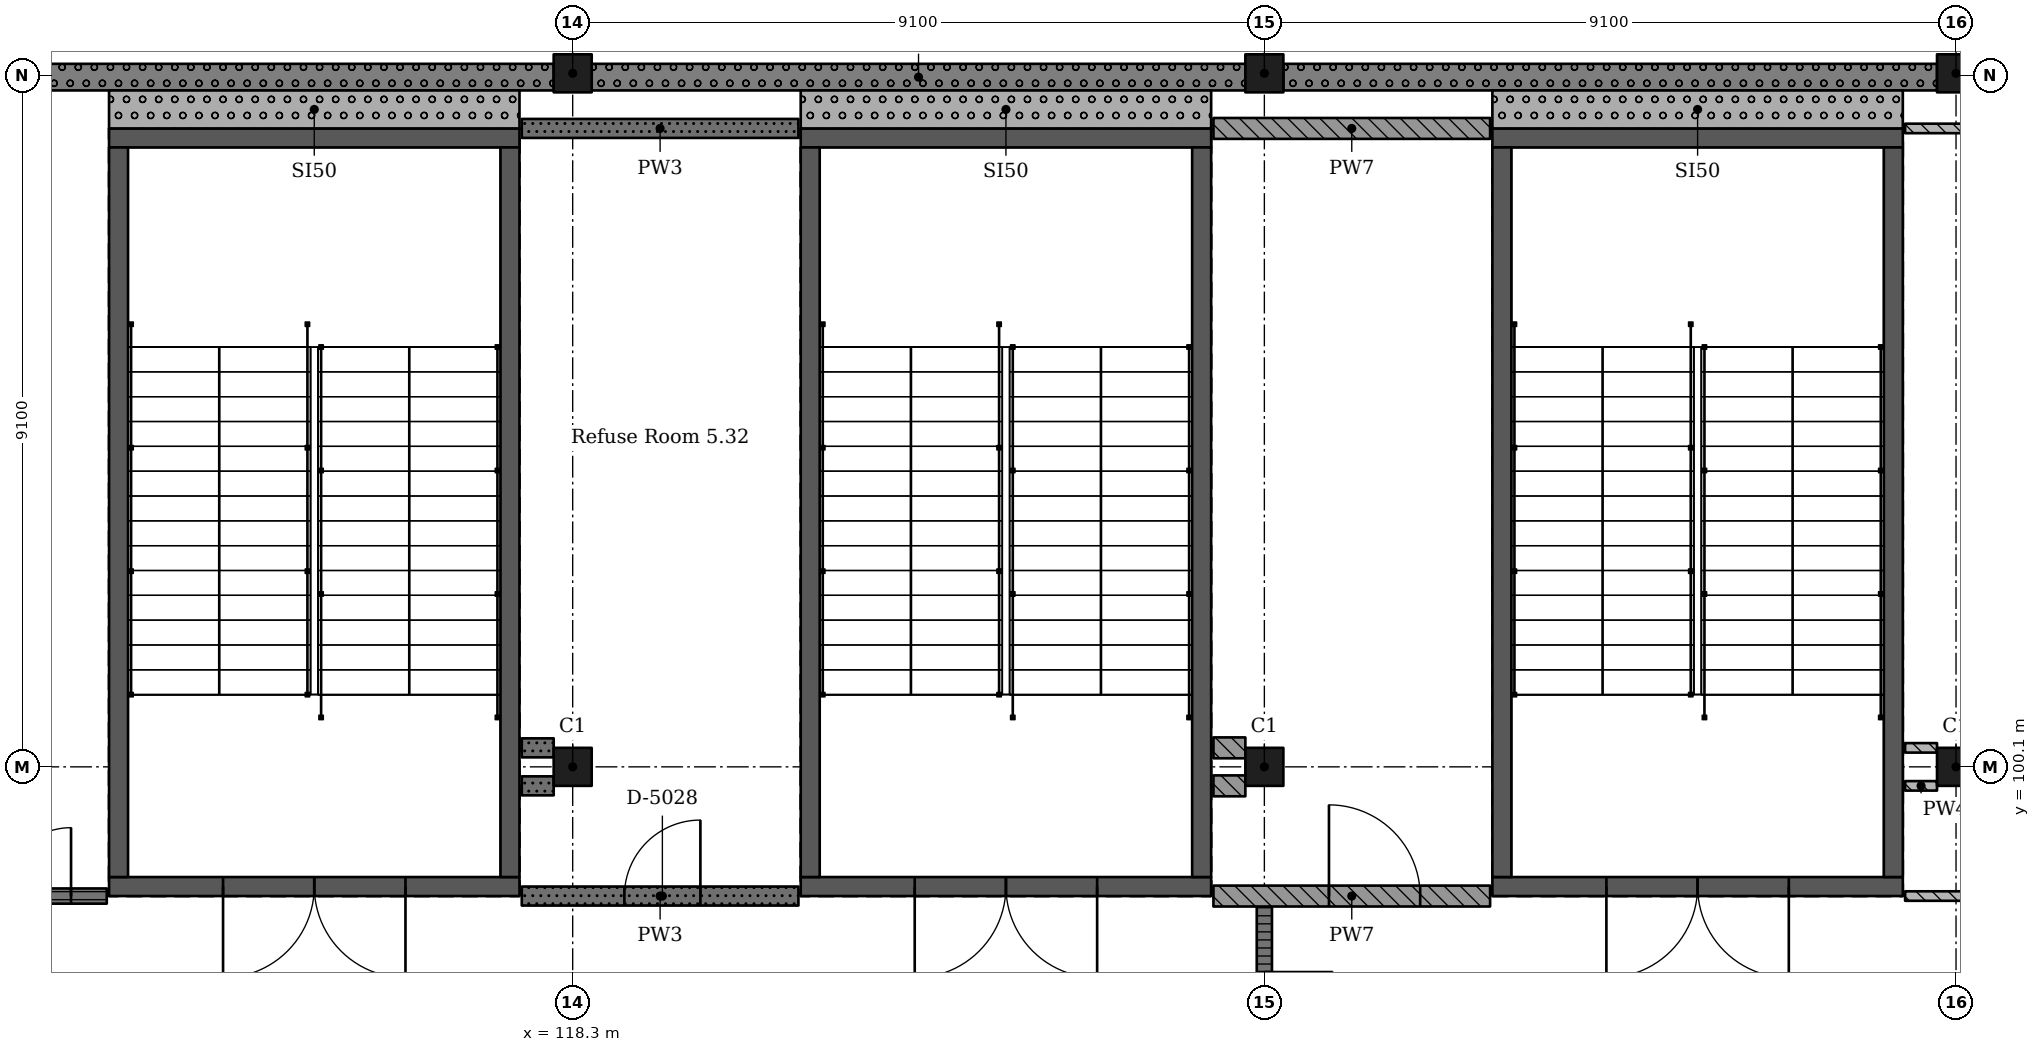
"""IFC4 building model, lengths in metres.
Left out: names, types, materials, properties, quantities, classifications, styles, units other than length and angle.
Written with IfcOpenShell. Run it as: python <this file> out.ifc"""

import sys

from ifc_helpers import new_model, si_unit, direction, frame, frame_2d, origin, origin_2d, place, context, subcontext, project, spatial, rectangle, extrude, element, fill, save


model = new_model("IFC4")
c1 = context("Model", 3, precision=1e-05, world=origin(), true_north=direction((0.0, 1.0)))
c2 = subcontext(c1, "Body", "Model", "MODEL_VIEW")
j1 = project(units=[si_unit("LENGTHUNIT", "METRE"), si_unit("PLANEANGLEUNIT", "RADIAN")], contexts=[c1])
p1 = place(None, origin())
s1 = spatial("IfcSite", under=j1, at=p1, CompositionType="ELEMENT")
p2 = place(p1, origin())
s2 = spatial("IfcBuilding", under=s1, at=p2, CompositionType="ELEMENT")
p3 = place(p2, frame((0.0, 0.0, 24.57)))
s3 = spatial("IfcBuildingStorey", under=s2, at=p3, CompositionType="ELEMENT", Elevation=24.57)
for number, where, z_axis, x_axis in (
    (1, (118.3, 100.1, 0.0), (0.0, 0.0, 1.0), (1.0, 0.0, 0.0)),
    (2, (118.3, 109.225, 0.0), (0.0, 0.0, 1.0), (1.0, 0.0, 0.0)),
    (3, (127.4, 100.1, 0.0), (0.0, 0.0, 1.0), (1.0, 0.0, 0.0)),
    (4, (127.4, 109.225, 0.0), (0.0, 0.0, 1.0), (1.0, 0.0, 0.0)),
    (5, (136.5, 100.1, 0.0), (0.0, 0.0, 1.0), (1.0, 0.0, 0.0)),
    (6, (136.5, 109.225, 0.0), (0.0, 0.0, 1.0), (1.0, 0.0, 0.0)),
):
    element("IfcColumn", number, at=place(p3, frame(where, z_axis=z_axis, x_axis=x_axis)), inside=s3, PredefinedType="COLUMN", context=c2, shape_type="SweptSolid", body=[
        extrude(rectangle(XDim=0.5, YDim=0.5, at=origin_2d()), origin(), (0.0, 0.0, 1.0), 4.55),
    ])
p4 = place(p3, frame((135.8, 98.525, 0.0), z_axis=(0.0, 0.0, 1.0), x_axis=(-1.0, 0.0, 0.0)))
e7 = element("IfcWall", 7, at=p4, inside=s3, PredefinedType="SHEAR", context=c2, shape_type="SweptSolid", body=[
    extrude(rectangle(XDim=5.4, YDim=0.25, at=frame_2d((2.7, 0.0))), origin(), (0.0, 0.0, 1.0), 4.55),
])
p5 = place(p4, frame((1.5, 0.0, 0.0)))
e8 = element("IfcOpeningElement", 8, at=p5, cuts=e7, PredefinedType="OPENING", context=c2, shape_type="SweptSolid", body=[
    extrude(rectangle(XDim=2.4, YDim=2.1, at=frame_2d((1.2, 1.05))), frame((0.0, 0.135, 0.0), z_axis=(0.0, -1.0, 0.0), x_axis=(1.0, 0.0, 0.0)), (0.0, 0.0, 1.0), 0.27),
])
p6 = place(p3, frame((135.8, 108.375, 0.0), z_axis=(0.0, 0.0, 1.0), x_axis=(-1.0, 0.0, 0.0)))
e9 = element("IfcWall", 9, at=p6, inside=s3, PredefinedType="SHEAR", context=c2, shape_type="SweptSolid", body=[
    extrude(rectangle(XDim=5.4, YDim=0.25, at=frame_2d((2.7, 0.0))), origin(), (0.0, 0.0, 1.0), 4.55),
])
for number, where, z_axis, x_axis in (
    (10, (130.525, 108.25, 0.0), (0.0, 0.0, 1.0), (0.0, -1.0, 0.0)),
    (11, (135.675, 108.25, 0.0), (0.0, 0.0, 1.0), (0.0, -1.0, 0.0)),
):
    element("IfcWall", number, at=place(p3, frame(where, z_axis=z_axis, x_axis=x_axis)), inside=s3, PredefinedType="SHEAR", context=c2, shape_type="SweptSolid", body=[
        extrude(rectangle(XDim=9.6, YDim=0.25, at=frame_2d((4.8, 0.0))), origin(), (0.0, 0.0, 1.0), 4.55),
    ])
p7 = place(p3, frame((126.7, 98.525, 0.0), z_axis=(0.0, 0.0, 1.0), x_axis=(-1.0, 0.0, 0.0)))
e12 = element("IfcWall", 12, at=p7, inside=s3, PredefinedType="SHEAR", context=c2, shape_type="SweptSolid", body=[
    extrude(rectangle(XDim=5.4, YDim=0.25, at=frame_2d((2.7, 0.0))), origin(), (0.0, 0.0, 1.0), 4.55),
])
p8 = place(p7, frame((1.5, 0.0, 0.0)))
e13 = element("IfcOpeningElement", 13, at=p8, cuts=e12, PredefinedType="OPENING", context=c2, shape_type="SweptSolid", body=[
    extrude(rectangle(XDim=2.4, YDim=2.1, at=frame_2d((1.2, 1.05))), frame((0.0, 0.135, 0.0), z_axis=(0.0, -1.0, 0.0), x_axis=(1.0, 0.0, 0.0)), (0.0, 0.0, 1.0), 0.27),
])
p9 = place(p3, frame((126.7, 108.375, 0.0), z_axis=(0.0, 0.0, 1.0), x_axis=(-1.0, 0.0, 0.0)))
e14 = element("IfcWall", 14, at=p9, inside=s3, PredefinedType="SHEAR", context=c2, shape_type="SweptSolid", body=[
    extrude(rectangle(XDim=5.4, YDim=0.25, at=frame_2d((2.7, 0.0))), origin(), (0.0, 0.0, 1.0), 4.55),
])
for number, where, z_axis, x_axis in (
    (15, (121.425, 108.25, 0.0), (0.0, 0.0, 1.0), (0.0, -1.0, 0.0)),
    (16, (126.575, 108.25, 0.0), (0.0, 0.0, 1.0), (0.0, -1.0, 0.0)),
):
    element("IfcWall", number, at=place(p3, frame(where, z_axis=z_axis, x_axis=x_axis)), inside=s3, PredefinedType="SHEAR", context=c2, shape_type="SweptSolid", body=[
        extrude(rectangle(XDim=9.6, YDim=0.25, at=frame_2d((4.8, 0.0))), origin(), (0.0, 0.0, 1.0), 4.55),
    ])
p10 = place(p3, frame((117.6, 98.525, 0.0), z_axis=(0.0, 0.0, 1.0), x_axis=(-1.0, 0.0, 0.0)))
e17 = element("IfcWall", 17, at=p10, inside=s3, PredefinedType="SHEAR", context=c2, shape_type="SweptSolid", body=[
    extrude(rectangle(XDim=5.4, YDim=0.25, at=frame_2d((2.7, 0.0))), origin(), (0.0, 0.0, 1.0), 4.55),
])
p11 = place(p10, frame((1.5, 0.0, 0.0)))
e18 = element("IfcOpeningElement", 18, at=p11, cuts=e17, PredefinedType="OPENING", context=c2, shape_type="SweptSolid", body=[
    extrude(rectangle(XDim=2.4, YDim=2.1, at=frame_2d((1.2, 1.05))), frame((0.0, 0.135, 0.0), z_axis=(0.0, -1.0, 0.0), x_axis=(1.0, 0.0, 0.0)), (0.0, 0.0, 1.0), 0.27),
])
p12 = place(p3, frame((117.6, 108.375, 0.0), z_axis=(0.0, 0.0, 1.0), x_axis=(-1.0, 0.0, 0.0)))
e19 = element("IfcWall", 19, at=p12, inside=s3, PredefinedType="SHEAR", context=c2, shape_type="SweptSolid", body=[
    extrude(rectangle(XDim=5.4, YDim=0.25, at=frame_2d((2.7, 0.0))), origin(), (0.0, 0.0, 1.0), 4.55),
])
for number, where, z_axis, x_axis in (
    (20, (112.325, 108.25, 0.0), (0.0, 0.0, 1.0), (0.0, -1.0, 0.0)),
    (21, (117.475, 108.25, 0.0), (0.0, 0.0, 1.0), (0.0, -1.0, 0.0)),
):
    element("IfcWall", number, at=place(p3, frame(where, z_axis=z_axis, x_axis=x_axis)), inside=s3, PredefinedType="SHEAR", context=c2, shape_type="SweptSolid", body=[
        extrude(rectangle(XDim=9.6, YDim=0.25, at=frame_2d((4.8, 0.0))), origin(), (0.0, 0.0, 1.0), 4.55),
    ])
p13 = place(p3, frame((136.25, 109.175, 0.0), z_axis=(0.0, 0.0, 1.0), x_axis=(-1.0, 0.0, 0.0)))
e22 = element("IfcWall", 22, at=p13, inside=s3, PredefinedType="SOLIDWALL", context=c2, shape_type="SweptSolid", body=[
    extrude(rectangle(XDim=8.6, YDim=0.35, at=frame_2d((4.3, 0.0))), origin(), (0.0, 0.0, 1.0), 3.6),
])
p14 = place(p3, frame((127.15, 109.175, 0.0), z_axis=(0.0, 0.0, 1.0), x_axis=(-1.0, 0.0, 0.0)))
e23 = element("IfcWall", 23, at=p14, inside=s3, PredefinedType="SOLIDWALL", context=c2, shape_type="SweptSolid", body=[
    extrude(rectangle(XDim=8.6, YDim=0.35, at=frame_2d((4.3, 0.0))), origin(), (0.0, 0.0, 1.0), 3.6),
])
p15 = place(p3, frame((118.05, 109.175, 0.0), z_axis=(0.0, 0.0, 1.0), x_axis=(-1.0, 0.0, 0.0)))
e24 = element("IfcWall", 24, at=p15, inside=s3, PredefinedType="SOLIDWALL", context=c2, shape_type="SweptSolid", body=[
    extrude(rectangle(XDim=8.6, YDim=0.35, at=frame_2d((4.3, 0.0))), origin(), (0.0, 0.0, 1.0), 3.6),
])
p16 = place(p3, frame((130.4, 108.75, 0.0), z_axis=(0.0, 0.0, 1.0), x_axis=(1.0, 0.0, 0.0)))
e25 = element("IfcWall", 25, at=p16, inside=s3, PredefinedType="SOLIDWALL", context=c2, shape_type="SweptSolid", body=[
    extrude(rectangle(XDim=5.4, YDim=0.5, at=frame_2d((2.7, 0.0))), origin(), (0.0, 0.0, 1.0), 4.35),
])
p17 = place(p3, frame((121.3, 108.75, 0.0), z_axis=(0.0, 0.0, 1.0), x_axis=(1.0, 0.0, 0.0)))
e26 = element("IfcWall", 26, at=p17, inside=s3, PredefinedType="SOLIDWALL", context=c2, shape_type="SweptSolid", body=[
    extrude(rectangle(XDim=5.4, YDim=0.5, at=frame_2d((2.7, 0.0))), origin(), (0.0, 0.0, 1.0), 4.35),
])
p18 = place(p3, frame((112.2, 108.75, 0.0), z_axis=(0.0, 0.0, 1.0), x_axis=(1.0, 0.0, 0.0)))
e27 = element("IfcWall", 27, at=p18, inside=s3, PredefinedType="SOLIDWALL", context=c2, shape_type="SweptSolid", body=[
    extrude(rectangle(XDim=5.4, YDim=0.5, at=frame_2d((2.7, 0.0))), origin(), (0.0, 0.0, 1.0), 4.35),
])
p19 = place(p3, frame((109.35, 98.4, 0.0), z_axis=(0.0, 0.0, 1.0), x_axis=(1.0, 0.0, 0.0)))
e28 = element("IfcWall", 28, at=p19, inside=s3, PredefinedType="PARTITIONING", context=c2, shape_type="SweptSolid", body=[
    extrude(rectangle(XDim=2.82, YDim=0.2, at=frame_2d((1.41, 0.0))), origin(), (0.0, 0.0, 1.0), 4.35),
])
p20 = place(p19, frame((0.55, 0.0, 0.0)))
e29 = element("IfcOpeningElement", 29, at=p20, cuts=e28, PredefinedType="OPENING", context=c2, shape_type="SweptSolid", body=[
    extrude(rectangle(XDim=1.8, YDim=2.4, at=frame_2d((0.9, 1.2))), frame((0.0, 0.11, 0.0), z_axis=(0.0, -1.0, 0.0), x_axis=(1.0, 0.0, 0.0)), (0.0, 0.0, 1.0), 0.22),
])
p21 = place(p3, frame((117.63, 98.4, 0.0), z_axis=(0.0, 0.0, 1.0), x_axis=(1.0, 0.0, 0.0)))
e30 = element("IfcWall", 30, at=p21, inside=s3, PredefinedType="SOLIDWALL", context=c2, shape_type="SweptSolid", body=[
    extrude(rectangle(XDim=3.64, YDim=0.25, at=frame_2d((1.82, 0.0))), origin(), (0.0, 0.0, 1.0), 4.35),
])
p22 = place(p21, frame((1.35, 0.0, 0.0)))
e31 = element("IfcOpeningElement", 31, at=p22, cuts=e30, PredefinedType="OPENING", context=c2, shape_type="SweptSolid", body=[
    extrude(rectangle(XDim=1.0, YDim=2.1, at=frame_2d((0.5, 1.05))), frame((0.0, 0.135, 0.0), z_axis=(0.0, -1.0, 0.0), x_axis=(1.0, 0.0, 0.0)), (0.0, 0.0, 1.0), 0.27),
])
p23 = place(p3, frame((117.63, 99.85, 0.0), z_axis=(0.0, 0.0, 1.0), x_axis=(1.0, 0.0, 0.0)))
e32 = element("IfcWall", 32, at=p23, inside=s3, PredefinedType="SOLIDWALL", context=c2, shape_type="SweptSolid", body=[
    extrude(rectangle(XDim=0.42, YDim=0.25, at=frame_2d((0.21, 0.0))), origin(), (0.0, 0.0, 1.0), 4.35),
])
p24 = place(p3, frame((117.63, 108.5, 0.0), z_axis=(0.0, 0.0, 1.0), x_axis=(1.0, 0.0, 0.0)))
e33 = element("IfcWall", 33, at=p24, inside=s3, PredefinedType="SOLIDWALL", context=c2, shape_type="SweptSolid", body=[
    extrude(rectangle(XDim=3.64, YDim=0.25, at=frame_2d((1.82, 0.0))), origin(), (0.0, 0.0, 1.0), 4.35),
])
p25 = place(p3, frame((118.05, 100.35, 0.0), z_axis=(0.0, 0.0, 1.0), x_axis=(-1.0, 0.0, 0.0)))
e34 = element("IfcWall", 34, at=p25, inside=s3, PredefinedType="SOLIDWALL", context=c2, shape_type="SweptSolid", body=[
    extrude(rectangle(XDim=0.42, YDim=0.25, at=frame_2d((0.21, 0.0))), origin(), (0.0, 0.0, 1.0), 4.35),
])
p26 = place(p3, frame((126.73, 98.4, 0.0), z_axis=(0.0, 0.0, 1.0), x_axis=(1.0, 0.0, 0.0)))
e35 = element("IfcWall", 35, at=p26, inside=s3, PredefinedType="SOLIDWALL", context=c2, shape_type="SweptSolid", body=[
    extrude(rectangle(XDim=3.64, YDim=0.275, at=frame_2d((1.82, 0.0))), origin(), (0.0, 0.0, 1.0), 4.35),
])
p27 = place(p26, frame((1.52, 0.0, 0.0)))
e36 = element("IfcOpeningElement", 36, at=p27, cuts=e35, PredefinedType="OPENING", context=c2, shape_type="SweptSolid", body=[
    extrude(rectangle(XDim=1.2, YDim=2.4, at=frame_2d((0.6, 1.2))), frame((0.0, 0.147, 0.0), z_axis=(0.0, -1.0, 0.0), x_axis=(1.0, 0.0, 0.0)), (0.0, 0.0, 1.0), 0.295),
])
p28 = place(p3, frame((126.73, 99.85, 0.0), z_axis=(0.0, 0.0, 1.0), x_axis=(1.0, 0.0, 0.0)))
e37 = element("IfcWall", 37, at=p28, inside=s3, PredefinedType="SOLIDWALL", context=c2, shape_type="SweptSolid", body=[
    extrude(rectangle(XDim=0.42, YDim=0.275, at=frame_2d((0.21, 0.0))), origin(), (0.0, 0.0, 1.0), 4.35),
])
p29 = place(p3, frame((126.73, 108.5, 0.0), z_axis=(0.0, 0.0, 1.0), x_axis=(1.0, 0.0, 0.0)))
e38 = element("IfcWall", 38, at=p29, inside=s3, PredefinedType="SOLIDWALL", context=c2, shape_type="SweptSolid", body=[
    extrude(rectangle(XDim=3.64, YDim=0.275, at=frame_2d((1.82, 0.0))), origin(), (0.0, 0.0, 1.0), 4.35),
])
p30 = place(p3, frame((127.15, 100.35, 0.0), z_axis=(0.0, 0.0, 1.0), x_axis=(-1.0, 0.0, 0.0)))
e39 = element("IfcWall", 39, at=p30, inside=s3, PredefinedType="SOLIDWALL", context=c2, shape_type="SweptSolid", body=[
    extrude(rectangle(XDim=0.42, YDim=0.275, at=frame_2d((0.21, 0.0))), origin(), (0.0, 0.0, 1.0), 4.35),
])
p31 = place(p3, frame((127.4, 91.25, 0.0), z_axis=(0.0, 0.0, 1.0), x_axis=(0.0, 1.0, 0.0)))
e40 = element("IfcWall", 40, at=p31, inside=s3, PredefinedType="PARTITIONING", context=c2, shape_type="SweptSolid", body=[
    extrude(rectangle(XDim=7.012, YDim=0.2, at=frame_2d((3.506, 0.0))), origin(), (0.0, 0.0, 1.0), 3.6),
])
p32 = place(p31, frame((0.85, 0.0, 0.0)))
e41 = element("IfcOpeningElement", 41, at=p32, cuts=e40, PredefinedType="OPENING", context=c2, shape_type="SweptSolid", body=[
    extrude(rectangle(XDim=1.8, YDim=2.4, at=frame_2d((0.9, 1.2))), frame((0.0, 0.11, 0.0), z_axis=(0.0, -1.0, 0.0), x_axis=(1.0, 0.0, 0.0)), (0.0, 0.0, 1.0), 0.22),
])
p33 = place(p31, frame((4.35, 0.0, 0.0)))
e42 = element("IfcOpeningElement", 42, at=p33, cuts=e40, PredefinedType="OPENING", context=c2, shape_type="SweptSolid", body=[
    extrude(rectangle(XDim=1.8, YDim=2.4, at=frame_2d((0.9, 1.2))), frame((0.0, 0.11, 0.0), z_axis=(0.0, -1.0, 0.0), x_axis=(1.0, 0.0, 0.0)), (0.0, 0.0, 1.0), 0.22),
])
p34 = place(p3, frame((135.83, 98.4, 0.0), z_axis=(0.0, 0.0, 1.0), x_axis=(1.0, 0.0, 0.0)))
e43 = element("IfcWall", 43, at=p34, inside=s3, PredefinedType="PARTITIONING", context=c2, shape_type="SweptSolid", body=[
    extrude(rectangle(XDim=3.64, YDim=0.125, at=frame_2d((1.82, 0.0))), origin(), (0.0, 0.0, 1.0), 4.35),
])
p35 = place(p34, frame((1.35, 0.0, 0.0)))
e44 = element("IfcOpeningElement", 44, at=p35, cuts=e43, PredefinedType="OPENING", context=c2, shape_type="SweptSolid", body=[
    extrude(rectangle(XDim=0.9, YDim=2.1, at=frame_2d((0.45, 1.05))), frame((0.0, 0.073, 0.0), z_axis=(0.0, -1.0, 0.0), x_axis=(1.0, 0.0, 0.0)), (0.0, 0.0, 1.0), 0.145),
])
p36 = place(p3, frame((135.83, 99.85, 0.0), z_axis=(0.0, 0.0, 1.0), x_axis=(1.0, 0.0, 0.0)))
e45 = element("IfcWall", 45, at=p36, inside=s3, PredefinedType="PARTITIONING", context=c2, shape_type="SweptSolid", body=[
    extrude(rectangle(XDim=0.42, YDim=0.125, at=frame_2d((0.21, 0.0))), origin(), (0.0, 0.0, 1.0), 4.35),
])
p37 = place(p3, frame((135.83, 108.5, 0.0), z_axis=(0.0, 0.0, 1.0), x_axis=(1.0, 0.0, 0.0)))
e46 = element("IfcWall", 46, at=p37, inside=s3, PredefinedType="PARTITIONING", context=c2, shape_type="SweptSolid", body=[
    extrude(rectangle(XDim=3.64, YDim=0.125, at=frame_2d((1.82, 0.0))), origin(), (0.0, 0.0, 1.0), 4.35),
])
p38 = place(p3, frame((136.25, 100.35, 0.0), z_axis=(0.0, 0.0, 1.0), x_axis=(-1.0, 0.0, 0.0)))
e47 = element("IfcWall", 47, at=p38, inside=s3, PredefinedType="PARTITIONING", context=c2, shape_type="SweptSolid", body=[
    extrude(rectangle(XDim=0.42, YDim=0.125, at=frame_2d((0.21, 0.0))), origin(), (0.0, 0.0, 1.0), 4.35),
])
p39 = place(p27, origin())
e48 = element("IfcDoor", 48, at=p39, inside=s3, OperationType="SINGLE_SWING_RIGHT", PredefinedType="DOOR", context=c2, shape_type="SweptSolid", body=[
    extrude(rectangle(XDim=1.2, YDim=2.4, at=frame_2d((0.6, 1.2))), frame((0.0, 0.025, 0.0), z_axis=(0.0, -1.0, 0.0), x_axis=(1.0, 0.0, 0.0)), (0.0, 0.0, 1.0), 0.05),
])
fill(e36, e48)
p40 = place(p22, origin())
e49 = element("IfcDoor", 49, at=p40, inside=s3, OperationType="SINGLE_SWING_LEFT", PredefinedType="DOOR", context=c2, shape_type="SweptSolid", body=[
    extrude(rectangle(XDim=1.0, YDim=2.1, at=frame_2d((0.5, 1.05))), frame((0.0, 0.025, 0.0), z_axis=(0.0, -1.0, 0.0), x_axis=(1.0, 0.0, 0.0)), (0.0, 0.0, 1.0), 0.05),
])
fill(e31, e49)
p41 = place(p33, origin())
e50 = element("IfcDoor", 50, at=p41, inside=s3, OperationType="DOUBLE_DOOR_SINGLE_SWING", PredefinedType="DOOR", context=c2, shape_type="SweptSolid", body=[
    extrude(rectangle(XDim=1.8, YDim=2.4, at=frame_2d((0.9, 1.2))), frame((0.0, 0.025, 0.0), z_axis=(0.0, -1.0, 0.0), x_axis=(1.0, 0.0, 0.0)), (0.0, 0.0, 1.0), 0.05),
])
fill(e42, e50)
p42 = place(p20, origin())
e51 = element("IfcDoor", 51, at=p42, inside=s3, OperationType="DOUBLE_DOOR_SINGLE_SWING", PredefinedType="DOOR", context=c2, shape_type="SweptSolid", body=[
    extrude(rectangle(XDim=1.8, YDim=2.4, at=frame_2d((0.9, 1.2))), frame((0.0, 0.025, 0.0), z_axis=(0.0, -1.0, 0.0), x_axis=(1.0, 0.0, 0.0)), (0.0, 0.0, 1.0), 0.05),
])
fill(e29, e51)
p43 = place(p5, origin())
e52 = element("IfcDoor", 52, at=p43, inside=s3, OperationType="DOUBLE_DOOR_SINGLE_SWING", PredefinedType="DOOR", context=c2, shape_type="SweptSolid", body=[
    extrude(rectangle(XDim=2.4, YDim=2.1, at=frame_2d((1.2, 1.05))), frame((0.0, 0.025, 0.0), z_axis=(0.0, -1.0, 0.0), x_axis=(1.0, 0.0, 0.0)), (0.0, 0.0, 1.0), 0.05),
])
fill(e8, e52)
p44 = place(p8, origin())
e53 = element("IfcDoor", 53, at=p44, inside=s3, OperationType="DOUBLE_DOOR_SINGLE_SWING", PredefinedType="DOOR", context=c2, shape_type="SweptSolid", body=[
    extrude(rectangle(XDim=2.4, YDim=2.1, at=frame_2d((1.2, 1.05))), frame((0.0, 0.025, 0.0), z_axis=(0.0, -1.0, 0.0), x_axis=(1.0, 0.0, 0.0)), (0.0, 0.0, 1.0), 0.05),
])
fill(e13, e53)
p45 = place(p11, origin())
e54 = element("IfcDoor", 54, at=p45, inside=s3, OperationType="DOUBLE_DOOR_SINGLE_SWING", PredefinedType="DOOR", context=c2, shape_type="SweptSolid", body=[
    extrude(rectangle(XDim=2.4, YDim=2.1, at=frame_2d((1.2, 1.05))), frame((0.0, 0.025, 0.0), z_axis=(0.0, -1.0, 0.0), x_axis=(1.0, 0.0, 0.0)), (0.0, 0.0, 1.0), 0.05),
])
fill(e18, e54)
save(model, sys.argv[1])
